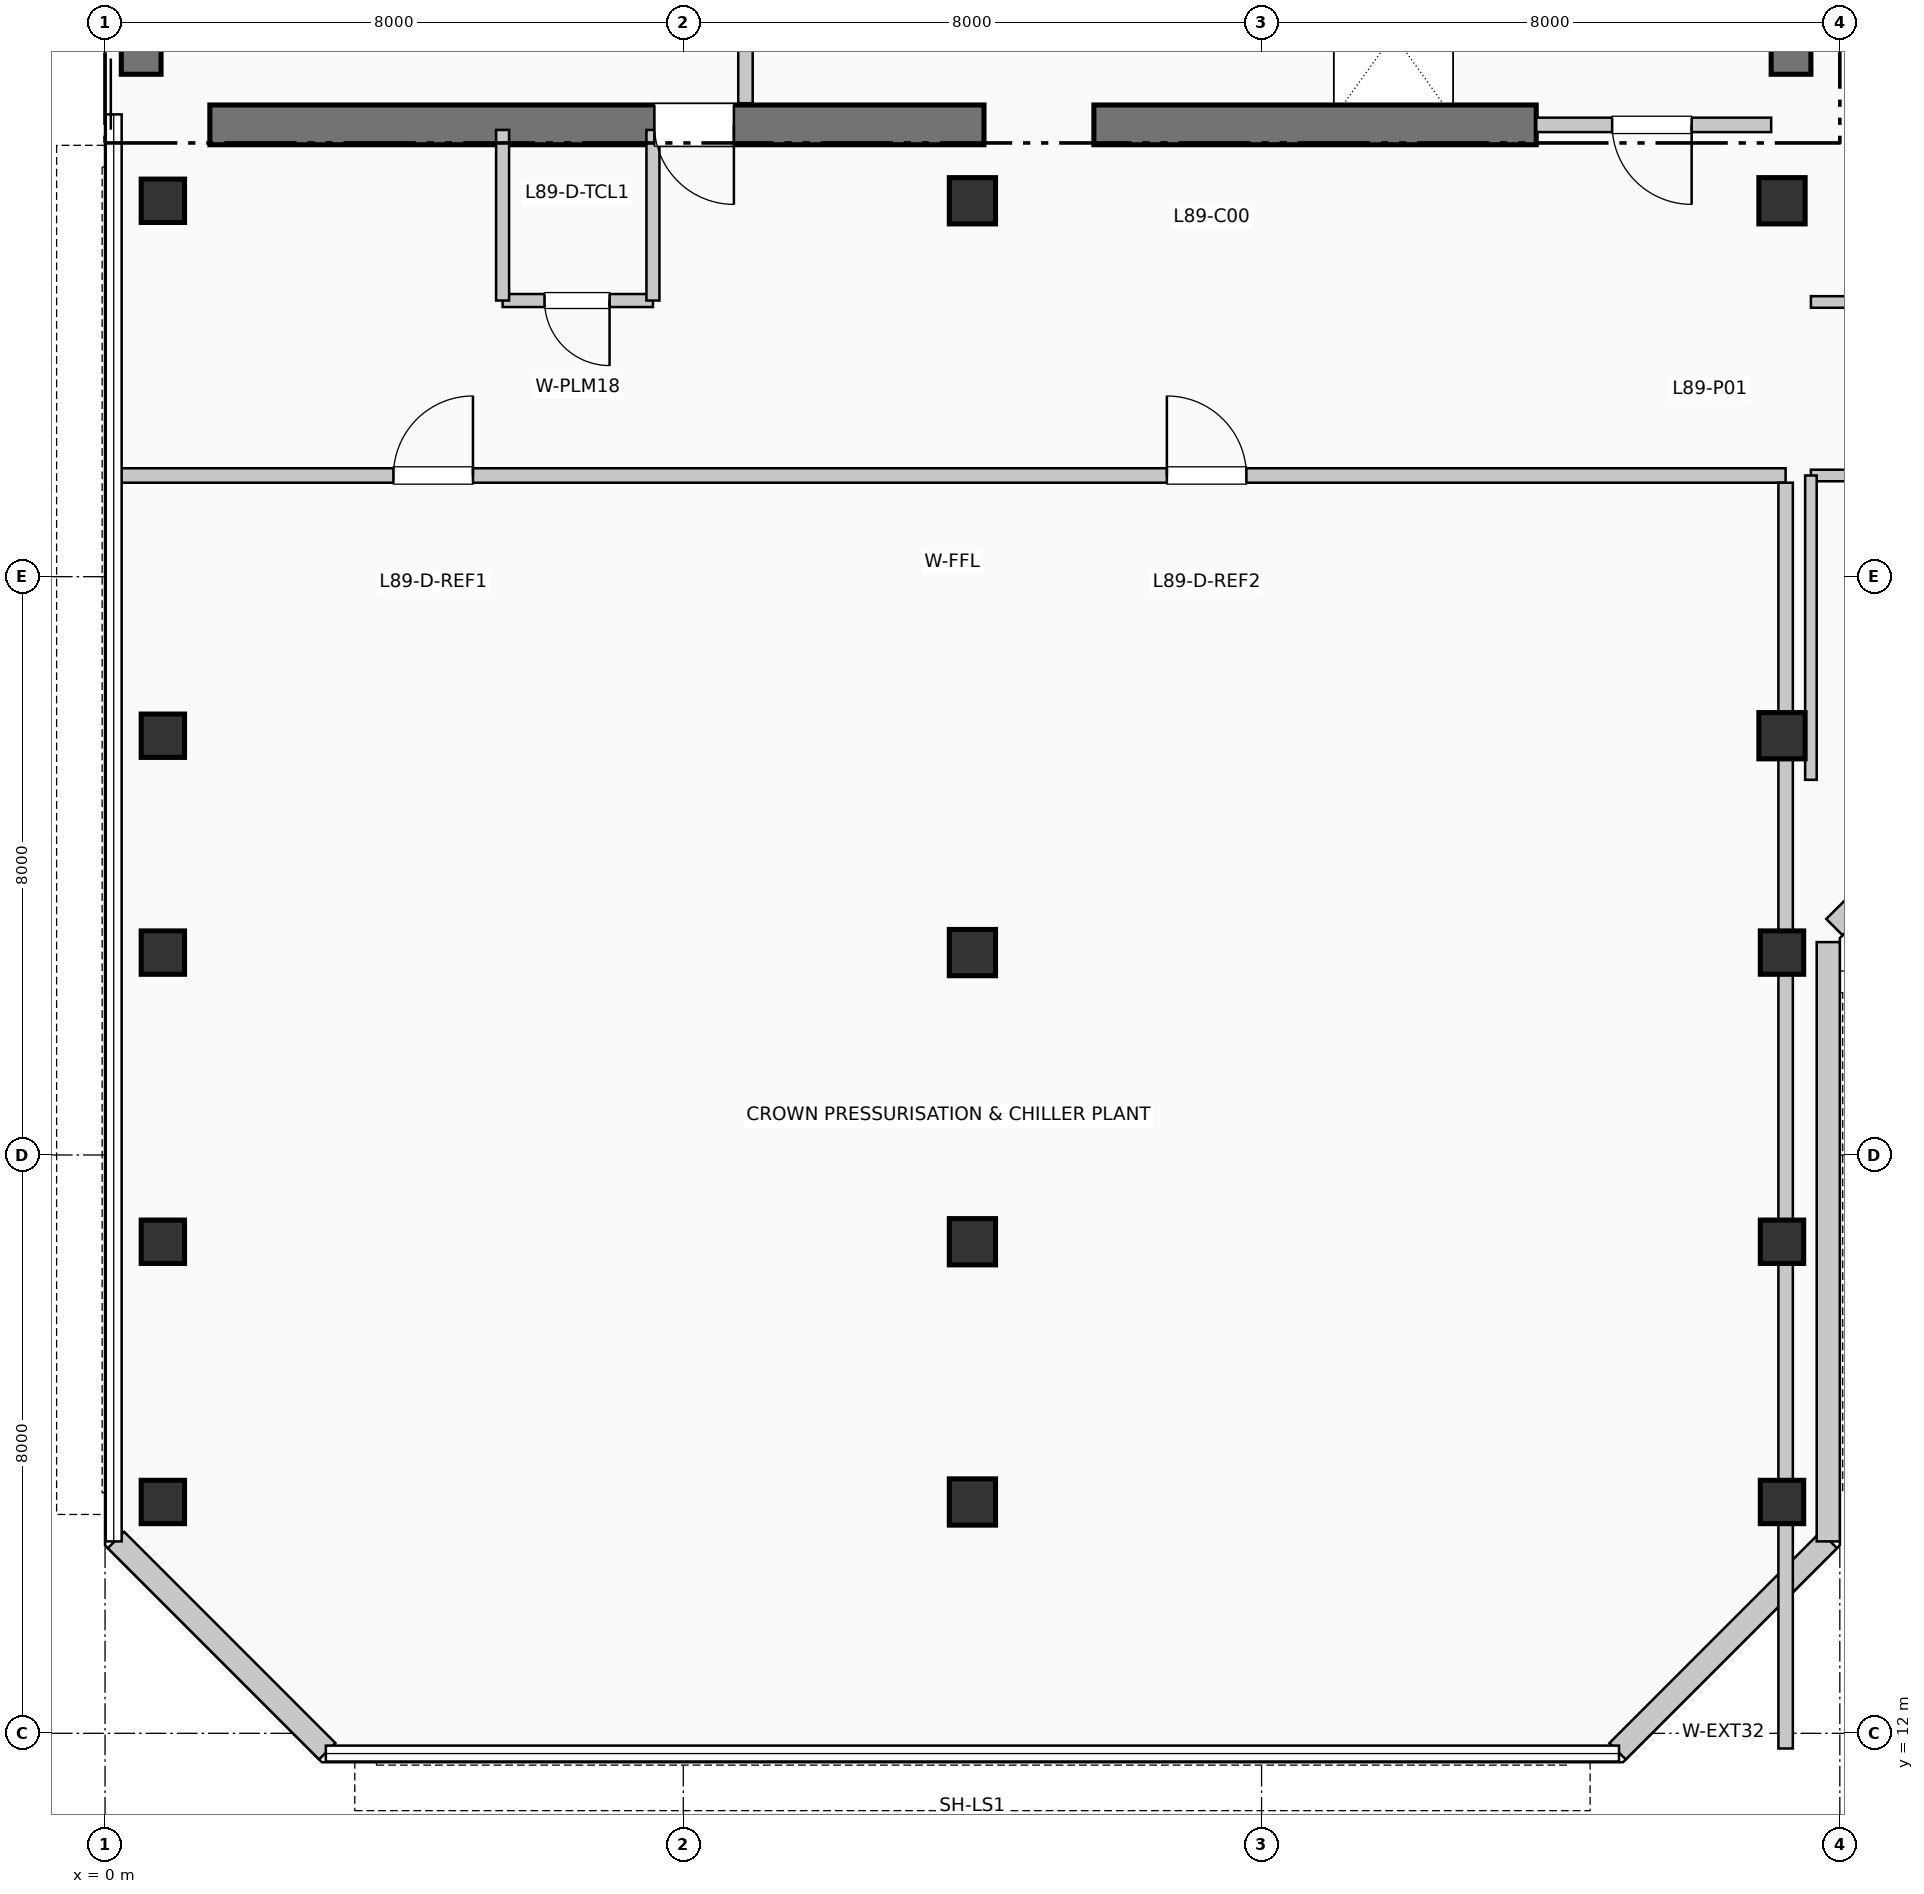
"""IFC4 building model, lengths in metres.
Left out: names, types, materials, properties, quantities, classifications, styles, units other than length and angle.
Written with IfcOpenShell. Run it as: python <this file> out.ifc"""

import sys

from ifc_helpers import new_model, si_unit, direction, frame, frame_2d, origin, origin_2d, place, context, subcontext, project, spatial, rectangle, extrude, element, fill, save


model = new_model("IFC4")
c1 = context("Model", 3, precision=1e-05, world=origin(), true_north=direction((0.0, 1.0)))
c2 = subcontext(c1, "Body", "Model", "MODEL_VIEW")
j1 = project(units=[si_unit("LENGTHUNIT", "METRE"), si_unit("PLANEANGLEUNIT", "RADIAN")], contexts=[c1])
p1 = place(None, origin())
s1 = spatial("IfcSite", under=j1, at=p1, CompositionType="ELEMENT")
p2 = place(p1, origin())
s2 = spatial("IfcBuilding", under=s1, at=p2, CompositionType="ELEMENT")
p3 = place(p2, frame((0.0, 0.0, 365.97)))
s3 = spatial("IfcBuildingStorey", under=s2, at=p3, CompositionType="ELEMENT", Elevation=365.97)
p4 = place(p3, frame((0.5, 34.95, 0.0), z_axis=(0.0, 0.0, 1.0), x_axis=(0.0, 1.0, 0.0)))
e1 = element("IfcWall", 1, at=p4, inside=s3, PredefinedType="SHEAR", context=c2, shape_type="SweptSolid", body=[
    extrude(rectangle(XDim=7.9, YDim=0.55, at=frame_2d((3.95, 0.0))), origin(), (0.0, 0.0, 1.0), 3.96),
])
p5 = place(p3, frame((23.325, 34.95, 0.0), z_axis=(0.0, 0.0, 1.0), x_axis=(0.0, 1.0, 0.0)))
e2 = element("IfcWall", 2, at=p5, inside=s3, PredefinedType="SHEAR", context=c2, shape_type="SweptSolid", body=[
    extrude(rectangle(XDim=10.64, YDim=0.55, at=frame_2d((5.32, 0.0))), origin(), (0.0, 0.0, 1.0), 3.96),
])
p6 = place(p3, frame((1.45, 34.25, 0.0), z_axis=(0.0, 0.0, 1.0), x_axis=(1.0, 0.0, 0.0)))
e3 = element("IfcWall", 3, at=p6, inside=s3, PredefinedType="SHEAR", context=c2, shape_type="SweptSolid", body=[
    extrude(rectangle(XDim=10.71, YDim=0.55, at=frame_2d((5.355, 0.0))), origin(), (0.0, 0.0, 1.0), 3.96),
])
p7 = place(p6, frame((7.25, 0.0, 0.0), z_axis=(0.0, 0.0, 1.0), x_axis=(-1.0, 0.0, 0.0)))
e4 = element("IfcOpeningElement", 4, at=p7, cuts=e3, PredefinedType="OPENING", context=c2, shape_type="SweptSolid", body=[
    extrude(rectangle(XDim=1.1, YDim=2.15, at=frame_2d((0.55, 1.075))), frame((0.0, 0.285, 0.0), z_axis=(0.0, -1.0, 0.0), x_axis=(1.0, 0.0, 0.0)), (0.0, 0.0, 1.0), 0.57),
])
p8 = place(p3, frame((13.68, 34.25, 0.0), z_axis=(0.0, 0.0, 1.0), x_axis=(1.0, 0.0, 0.0)))
e5 = element("IfcWall", 5, at=p8, inside=s3, PredefinedType="SHEAR", context=c2, shape_type="SweptSolid", body=[
    extrude(rectangle(XDim=6.12, YDim=0.55, at=frame_2d((3.06, 0.0))), origin(), (0.0, 0.0, 1.0), 3.96),
])
for number, where, z_axis, x_axis in (
    (6, (0.8, 15.2, 0.0), (0.0, 0.0, 1.0), (1.0, 0.0, 0.0)),
    (7, (0.8, 18.8, 0.0), (0.0, 0.0, 1.0), (1.0, 0.0, 0.0)),
    (8, (0.8, 22.8, 0.0), (0.0, 0.0, 1.0), (1.0, 0.0, 0.0)),
    (9, (0.8, 25.8, 0.0), (0.0, 0.0, 1.0), (1.0, 0.0, 0.0)),
    (10, (0.8, 33.2, 0.0), (0.0, 0.0, 1.0), (1.0, 0.0, 0.0)),
):
    element("IfcColumn", number, at=place(p3, frame(where, z_axis=z_axis, x_axis=x_axis)), inside=s3, PredefinedType="COLUMN", context=c2, shape_type="SweptSolid", body=[
        extrude(rectangle(XDim=0.6, YDim=0.6, at=origin_2d()), origin(), (0.0, 0.0, 1.0), 3.96),
    ])
for number, where, z_axis, x_axis in (
    (11, (12.0, 15.2, 0.0), (0.0, 0.0, 1.0), (1.0, 0.0, 0.0)),
    (12, (12.0, 18.8, 0.0), (0.0, 0.0, 1.0), (1.0, 0.0, 0.0)),
    (13, (12.0, 22.8, 0.0), (0.0, 0.0, 1.0), (1.0, 0.0, 0.0)),
    (14, (12.0, 33.2, 0.0), (0.0, 0.0, 1.0), (1.0, 0.0, 0.0)),
):
    element("IfcColumn", number, at=place(p3, frame(where, z_axis=z_axis, x_axis=x_axis)), inside=s3, PredefinedType="COLUMN", context=c2, shape_type="SweptSolid", body=[
        extrude(rectangle(XDim=0.64, YDim=0.64, at=origin_2d()), origin(), (0.0, 0.0, 1.0), 3.96),
    ])
for number, where, z_axis, x_axis in (
    (15, (23.2, 15.2, 0.0), (0.0, 0.0, 1.0), (1.0, 0.0, 0.0)),
    (16, (23.2, 18.8, 0.0), (0.0, 0.0, 1.0), (1.0, 0.0, 0.0)),
    (17, (23.2, 22.8, 0.0), (0.0, 0.0, 1.0), (1.0, 0.0, 0.0)),
):
    element("IfcColumn", number, at=place(p3, frame(where, z_axis=z_axis, x_axis=x_axis)), inside=s3, PredefinedType="COLUMN", context=c2, shape_type="SweptSolid", body=[
        extrude(rectangle(XDim=0.6, YDim=0.6, at=origin_2d()), origin(), (0.0, 0.0, 1.0), 3.96),
    ])
for number, where, z_axis, x_axis in (
    (18, (23.2, 25.8, 0.0), (0.0, 0.0, 1.0), (1.0, 0.0, 0.0)),
    (19, (23.2, 33.2, 0.0), (0.0, 0.0, 1.0), (1.0, 0.0, 0.0)),
):
    element("IfcColumn", number, at=place(p3, frame(where, z_axis=z_axis, x_axis=x_axis)), inside=s3, PredefinedType="COLUMN", context=c2, shape_type="SweptSolid", body=[
        extrude(rectangle(XDim=0.64, YDim=0.64, at=origin_2d()), origin(), (0.0, 0.0, 1.0), 3.96),
    ])
p9 = place(p3, frame((20.926, 11.752, 0.0), z_axis=(0.0, 0.0, 1.0), x_axis=(0.707077242712, 0.707136318428, 0.0)))
e20 = element("IfcWall", 20, at=p9, inside=s3, PredefinedType="SOLIDWALL", context=c2, shape_type="SweptSolid", body=[
    extrude(rectangle(XDim=4.133, YDim=0.32, at=frame_2d((2.066, 0.0))), origin(), (0.0, 0.0, 1.0), 3.61),
])
p10 = place(p3, frame((23.84, 14.655, 0.0), z_axis=(0.0, 0.0, 1.0), x_axis=(0.0, 1.0, 0.0)))
e21 = element("IfcWall", 21, at=p10, inside=s3, PredefinedType="SOLIDWALL", context=c2, shape_type="SweptSolid", body=[
    extrude(rectangle(XDim=8.29, YDim=0.32, at=frame_2d((4.145, 0.0))), origin(), (0.0, 0.0, 1.0), 3.61),
])
p11 = place(p3, frame((23.926, 23.152, 0.0), z_axis=(0.0, 0.0, 1.0), x_axis=(0.707106781187, 0.707106781187, 0.0)))
e22 = element("IfcWall", 22, at=p11, inside=s3, PredefinedType="SOLIDWALL", context=c2, shape_type="SweptSolid", body=[
    extrude(rectangle(XDim=2.718, YDim=0.32, at=frame_2d((1.359, 0.0))), origin(), (0.0, 0.0, 1.0), 3.61),
])
p12 = place(p3, frame((0.152, 14.674, 0.0), z_axis=(0.0, 0.0, 1.0), x_axis=(0.707077242712, -0.707136318428, 0.0)))
e23 = element("IfcWall", 23, at=p12, inside=s3, PredefinedType="SOLIDWALL", context=c2, shape_type="SweptSolid", body=[
    extrude(rectangle(XDim=4.133, YDim=0.32, at=frame_2d((2.066, 0.0))), origin(), (0.0, 0.0, 1.0), 3.61),
])
p13 = place(p3, frame((8.86, 34.55, 0.0), z_axis=(0.0, 0.0, 1.0), x_axis=(0.0, 1.0, 0.0)))
e24 = element("IfcWall", 24, at=p13, inside=s3, PredefinedType="PARTITIONING", context=c2, shape_type="SweptSolid", body=[
    extrude(rectangle(XDim=2.5, YDim=0.2, at=frame_2d((1.25, 0.0))), origin(), (0.0, 0.0, 1.0), 3.61),
])
p14 = place(p3, frame((19.8, 34.25, 0.0), z_axis=(0.0, 0.0, 1.0), x_axis=(1.0, 0.0, 0.0)))
e25 = element("IfcWall", 25, at=p14, inside=s3, PredefinedType="PARTITIONING", context=c2, shape_type="SweptSolid", body=[
    extrude(rectangle(XDim=3.25, YDim=0.2, at=frame_2d((1.625, 0.0))), origin(), (0.0, 0.0, 1.0), 3.61),
])
p15 = place(p14, frame((2.15, 0.0, 0.0), z_axis=(0.0, 0.0, 1.0), x_axis=(-1.0, 0.0, 0.0)))
e26 = element("IfcOpeningElement", 26, at=p15, cuts=e25, PredefinedType="OPENING", context=c2, shape_type="SweptSolid", body=[
    extrude(rectangle(XDim=1.1, YDim=2.15, at=frame_2d((0.55, 1.075))), frame((0.0, 0.11, 0.0), z_axis=(0.0, -1.0, 0.0), x_axis=(1.0, 0.0, 0.0)), (0.0, 0.0, 1.0), 0.22),
])
p16 = place(p3, frame((5.5, 31.82, 0.0), z_axis=(0.0, 0.0, 1.0), x_axis=(1.0, 0.0, 0.0)))
e27 = element("IfcWall", 27, at=p16, inside=s3, PredefinedType="PLUMBINGWALL", context=c2, shape_type="SweptSolid", body=[
    extrude(rectangle(XDim=2.08, YDim=0.18, at=frame_2d((1.04, 0.0))), origin(), (0.0, 0.0, 1.0), 3.61),
])
p17 = place(p16, frame((1.48, 0.0, 0.0), z_axis=(0.0, 0.0, 1.0), x_axis=(-1.0, 0.0, 0.0)))
e28 = element("IfcOpeningElement", 28, at=p17, cuts=e27, PredefinedType="OPENING", context=c2, shape_type="SweptSolid", body=[
    extrude(rectangle(XDim=0.9, YDim=2.1, at=frame_2d((0.45, 1.05))), frame((0.0, 0.1, 0.0), z_axis=(0.0, -1.0, 0.0), x_axis=(1.0, 0.0, 0.0)), (0.0, 0.0, 1.0), 0.2),
])
for number, where, z_axis, x_axis in (
    (29, (7.58, 31.82, 0.0), (0.0, 0.0, 1.0), (0.0, 1.0, 0.0)),
    (30, (5.5, 31.82, 0.0), (0.0, 0.0, 1.0), (0.0, 1.0, 0.0)),
):
    element("IfcWall", number, at=place(p3, frame(where, z_axis=z_axis, x_axis=x_axis)), inside=s3, PredefinedType="PLUMBINGWALL", context=c2, shape_type="SweptSolid", body=[
        extrude(rectangle(XDim=2.36, YDim=0.18, at=frame_2d((1.18, 0.0))), origin(), (0.0, 0.0, 1.0), 3.61),
    ])
p18 = place(p3, frame((0.19, 29.4, 0.0), z_axis=(0.0, 0.0, 1.0), x_axis=(1.0, 0.0, 0.0)))
e31 = element("IfcWall", 31, at=p18, inside=s3, PredefinedType="PARTITIONING", context=c2, shape_type="SweptSolid", body=[
    extrude(rectangle(XDim=23.06, YDim=0.2, at=frame_2d((11.53, 0.0))), origin(), (0.0, 0.0, 1.0), 3.295),
])
p19 = place(p18, frame((3.8, 0.0, 0.0)))
e32 = element("IfcOpeningElement", 32, at=p19, cuts=e31, PredefinedType="OPENING", context=c2, shape_type="SweptSolid", body=[
    extrude(rectangle(XDim=1.1, YDim=2.15, at=frame_2d((0.55, 1.075))), frame((0.0, 0.11, 0.0), z_axis=(0.0, -1.0, 0.0), x_axis=(1.0, 0.0, 0.0)), (0.0, 0.0, 1.0), 0.22),
])
p20 = place(p18, frame((14.5, 0.0, 0.0)))
e33 = element("IfcOpeningElement", 33, at=p20, cuts=e31, PredefinedType="OPENING", context=c2, shape_type="SweptSolid", body=[
    extrude(rectangle(XDim=1.1, YDim=2.15, at=frame_2d((0.55, 1.075))), frame((0.0, 0.11, 0.0), z_axis=(0.0, -1.0, 0.0), x_axis=(1.0, 0.0, 0.0)), (0.0, 0.0, 1.0), 0.22),
])
p21 = place(p3, frame((23.25, 11.79, 0.0), z_axis=(0.0, 0.0, 1.0), x_axis=(0.0, 1.0, 0.0)))
e34 = element("IfcWall", 34, at=p21, inside=s3, PredefinedType="PARTITIONING", context=c2, shape_type="SweptSolid", body=[
    extrude(rectangle(XDim=17.51, YDim=0.2, at=frame_2d((8.755, 0.0))), origin(), (0.0, 0.0, 1.0), 3.095),
])
p22 = place(p3, frame((23.6, 31.8, 0.0), z_axis=(0.0, 0.0, 1.0), x_axis=(1.0, 0.0, 0.0)))
e35 = element("IfcWall", 35, at=p22, inside=s3, PredefinedType="PARTITIONING", context=c2, shape_type="SweptSolid", body=[
    extrude(rectangle(XDim=20.61, YDim=0.16, at=frame_2d((10.305, 0.0))), origin(), (0.0, 0.0, 1.0), 3.61),
])
p23 = place(p22, frame((2.5, 0.0, 0.0)))
e36 = element("IfcOpeningElement", 36, at=p23, cuts=e35, PredefinedType="OPENING", context=c2, shape_type="SweptSolid", body=[
    extrude(rectangle(XDim=0.95, YDim=2.1, at=frame_2d((0.475, 1.05))), frame((0.0, 0.09, 0.0), z_axis=(0.0, -1.0, 0.0), x_axis=(1.0, 0.0, 0.0)), (0.0, 0.0, 1.0), 0.18),
])
p24 = place(p22, frame((12.805, 0.0, 0.0)))
e37 = element("IfcOpeningElement", 37, at=p24, cuts=e35, PredefinedType="OPENING", context=c2, shape_type="SweptSolid", body=[
    extrude(rectangle(XDim=0.95, YDim=2.1, at=frame_2d((0.475, 1.05))), frame((0.0, 0.09, 0.0), z_axis=(0.0, -1.0, 0.0), x_axis=(1.0, 0.0, 0.0)), (0.0, 0.0, 1.0), 0.18),
])
p25 = place(p3, frame((23.6, 29.4, 0.0), z_axis=(0.0, 0.0, 1.0), x_axis=(1.0, 0.0, 0.0)))
e38 = element("IfcWall", 38, at=p25, inside=s3, PredefinedType="PARTITIONING", context=c2, shape_type="SweptSolid", body=[
    extrude(rectangle(XDim=20.61, YDim=0.16, at=frame_2d((10.305, 0.0))), origin(), (0.0, 0.0, 1.0), 3.295),
])
p26 = place(p25, frame((3.0, 0.0, 0.0)))
e39 = element("IfcOpeningElement", 39, at=p26, cuts=e38, PredefinedType="OPENING", context=c2, shape_type="SweptSolid", body=[
    extrude(rectangle(XDim=0.95, YDim=2.1, at=frame_2d((0.475, 1.05))), frame((0.0, 0.09, 0.0), z_axis=(0.0, -1.0, 0.0), x_axis=(1.0, 0.0, 0.0)), (0.0, 0.0, 1.0), 0.18),
])
p27 = place(p3, frame((23.6, 25.19, 0.0), z_axis=(0.0, 0.0, 1.0), x_axis=(0.0, 1.0, 0.0)))
e40 = element("IfcWall", 40, at=p27, inside=s3, PredefinedType="PARTITIONING", context=c2, shape_type="SweptSolid", body=[
    extrude(rectangle(XDim=4.21, YDim=0.16, at=frame_2d((2.105, 0.0))), origin(), (0.0, 0.0, 1.0), 3.095),
])
p28 = place(p7, origin())
e41 = element("IfcDoor", 41, at=p28, inside=s3, OperationType="SINGLE_SWING_RIGHT", PredefinedType="DOOR", context=c2, shape_type="SweptSolid", body=[
    extrude(rectangle(XDim=1.1, YDim=2.15, at=frame_2d((0.55, 1.075))), frame((0.0, 0.025, 0.0), z_axis=(0.0, -1.0, 0.0), x_axis=(1.0, 0.0, 0.0)), (0.0, 0.0, 1.0), 0.05),
])
fill(e4, e41)
p29 = place(p15, origin())
e42 = element("IfcDoor", 42, at=p29, inside=s3, OperationType="SINGLE_SWING_RIGHT", PredefinedType="DOOR", context=c2, shape_type="SweptSolid", body=[
    extrude(rectangle(XDim=1.1, YDim=2.15, at=frame_2d((0.55, 1.075))), frame((0.0, 0.025, 0.0), z_axis=(0.0, -1.0, 0.0), x_axis=(1.0, 0.0, 0.0)), (0.0, 0.0, 1.0), 0.05),
])
fill(e26, e42)
p30 = place(p17, origin())
e43 = element("IfcDoor", 43, at=p30, inside=s3, OperationType="SINGLE_SWING_RIGHT", PredefinedType="DOOR", context=c2, shape_type="SweptSolid", body=[
    extrude(rectangle(XDim=0.9, YDim=2.1, at=frame_2d((0.45, 1.05))), frame((0.0, 0.025, 0.0), z_axis=(0.0, -1.0, 0.0), x_axis=(1.0, 0.0, 0.0)), (0.0, 0.0, 1.0), 0.05),
])
fill(e28, e43)
p31 = place(p19, origin())
e44 = element("IfcDoor", 44, at=p31, inside=s3, OperationType="SINGLE_SWING_RIGHT", PredefinedType="DOOR", context=c2, shape_type="SweptSolid", body=[
    extrude(rectangle(XDim=1.1, YDim=2.15, at=frame_2d((0.55, 1.075))), frame((0.0, 0.025, 0.0), z_axis=(0.0, -1.0, 0.0), x_axis=(1.0, 0.0, 0.0)), (0.0, 0.0, 1.0), 0.05),
])
fill(e32, e44)
p32 = place(p20, origin())
e45 = element("IfcDoor", 45, at=p32, inside=s3, OperationType="SINGLE_SWING_LEFT", PredefinedType="DOOR", context=c2, shape_type="SweptSolid", body=[
    extrude(rectangle(XDim=1.1, YDim=2.15, at=frame_2d((0.55, 1.075))), frame((0.0, 0.025, 0.0), z_axis=(0.0, -1.0, 0.0), x_axis=(1.0, 0.0, 0.0)), (0.0, 0.0, 1.0), 0.05),
])
fill(e33, e45)
save(model, sys.argv[1])
